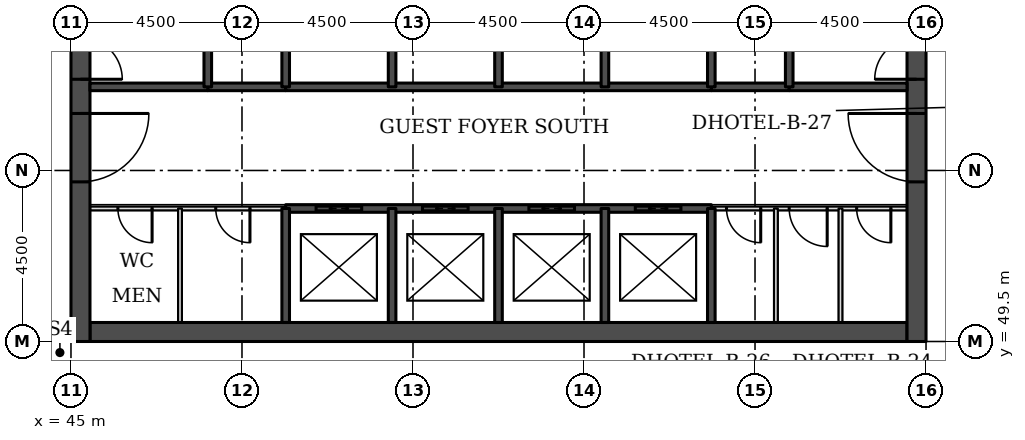
"""IFC4 building model, lengths in metres.
Left out: names, types, materials, properties, quantities, classifications, styles, units other than length and angle.
Written with IfcOpenShell. Run it as: python <this file> out.ifc"""

import sys

from ifc_helpers import new_model, si_unit, direction, frame, frame_2d, origin, place, context, subcontext, project, spatial, rectangle, extrude, element, fill, save


model = new_model("IFC4")
c1 = context("Model", 3, precision=1e-05, world=origin(), true_north=direction((0.0, 1.0)))
c2 = subcontext(c1, "Body", "Model", "MODEL_VIEW")
j1 = project(units=[si_unit("LENGTHUNIT", "METRE"), si_unit("PLANEANGLEUNIT", "RADIAN")], contexts=[c1])
p1 = place(None, origin())
s1 = spatial("IfcSite", under=j1, at=p1, CompositionType="ELEMENT")
p2 = place(p1, origin())
s2 = spatial("IfcBuilding", under=s1, at=p2, CompositionType="ELEMENT")
p3 = place(p2, frame((0.0, 0.0, 29.7)))
s3 = spatial("IfcBuildingStorey", under=s2, at=p3, CompositionType="ELEMENT", Elevation=29.7)
p4 = place(p3, frame((45.5, 49.75, 0.0), z_axis=(0.0, 0.0, 1.0), x_axis=(1.0, 0.0, 0.0)))
e1 = element("IfcWall", 1, at=p4, inside=s3, PredefinedType="SHEAR", context=c2, shape_type="SweptSolid", body=[
    extrude(rectangle(XDim=21.5, YDim=0.5, at=frame_2d((10.75, 0.0))), origin(), (0.0, 0.0, 1.0), 3.3),
])
p5 = place(p3, frame((45.25, 49.5, 0.0), z_axis=(0.0, 0.0, 1.0), x_axis=(0.0, 1.0, 0.0)))
e2 = element("IfcWall", 2, at=p5, inside=s3, PredefinedType="SHEAR", context=c2, shape_type="SweptSolid", body=[
    extrude(rectangle(XDim=22.5, YDim=0.5, at=frame_2d((11.25, 0.0))), origin(), (0.0, 0.0, 1.0), 3.3),
])
p6 = place(p5, frame((4.2, 0.0, 0.0)))
e3 = element("IfcOpeningElement", 3, at=p6, cuts=e2, PredefinedType="OPENING", context=c2, shape_type="SweptSolid", body=[
    extrude(rectangle(XDim=1.8, YDim=2.1, at=frame_2d((0.9, 1.05))), frame((0.0, 0.26, 0.0), z_axis=(0.0, -1.0, 0.0), x_axis=(1.0, 0.0, 0.0)), (0.0, 0.0, 1.0), 0.52),
])
p7 = place(p5, frame((6.9, 0.0, 0.0)))
e4 = element("IfcOpeningElement", 4, at=p7, cuts=e2, PredefinedType="OPENING", context=c2, shape_type="SweptSolid", body=[
    extrude(rectangle(XDim=1.1, YDim=2.1, at=frame_2d((0.55, 1.05))), frame((0.0, 0.26, 0.0), z_axis=(0.0, -1.0, 0.0), x_axis=(1.0, 0.0, 0.0)), (0.0, 0.0, 1.0), 0.52),
])
p8 = place(p5, frame((13.6, 0.0, 0.0)))
e5 = element("IfcOpeningElement", 5, at=p8, cuts=e2, PredefinedType="OPENING", context=c2, shape_type="SweptSolid", body=[
    extrude(rectangle(XDim=1.1, YDim=2.1, at=frame_2d((0.55, 1.05))), frame((0.0, 0.26, 0.0), z_axis=(0.0, -1.0, 0.0), x_axis=(1.0, 0.0, 0.0)), (0.0, 0.0, 1.0), 0.52),
])
p9 = place(p5, frame((16.5, 0.0, 0.0)))
e6 = element("IfcOpeningElement", 6, at=p9, cuts=e2, PredefinedType="OPENING", context=c2, shape_type="SweptSolid", body=[
    extrude(rectangle(XDim=1.8, YDim=2.1, at=frame_2d((0.9, 1.05))), frame((0.0, 0.26, 0.0), z_axis=(0.0, -1.0, 0.0), x_axis=(1.0, 0.0, 0.0)), (0.0, 0.0, 1.0), 0.52),
])
p10 = place(p3, frame((67.25, 49.5, 0.0), z_axis=(0.0, 0.0, 1.0), x_axis=(0.0, 1.0, 0.0)))
e7 = element("IfcWall", 7, at=p10, inside=s3, PredefinedType="SHEAR", context=c2, shape_type="SweptSolid", body=[
    extrude(rectangle(XDim=22.5, YDim=0.5, at=frame_2d((11.25, 0.0))), origin(), (0.0, 0.0, 1.0), 3.3),
])
p11 = place(p10, frame((4.2, 0.0, 0.0)))
e8 = element("IfcOpeningElement", 8, at=p11, cuts=e7, PredefinedType="OPENING", context=c2, shape_type="SweptSolid", body=[
    extrude(rectangle(XDim=1.8, YDim=2.1, at=frame_2d((0.9, 1.05))), frame((0.0, 0.26, 0.0), z_axis=(0.0, -1.0, 0.0), x_axis=(1.0, 0.0, 0.0)), (0.0, 0.0, 1.0), 0.52),
])
p12 = place(p10, frame((6.9, 0.0, 0.0)))
e9 = element("IfcOpeningElement", 9, at=p12, cuts=e7, PredefinedType="OPENING", context=c2, shape_type="SweptSolid", body=[
    extrude(rectangle(XDim=1.1, YDim=2.1, at=frame_2d((0.55, 1.05))), frame((0.0, 0.26, 0.0), z_axis=(0.0, -1.0, 0.0), x_axis=(1.0, 0.0, 0.0)), (0.0, 0.0, 1.0), 0.52),
])
p13 = place(p10, frame((13.6, 0.0, 0.0)))
e10 = element("IfcOpeningElement", 10, at=p13, cuts=e7, PredefinedType="OPENING", context=c2, shape_type="SweptSolid", body=[
    extrude(rectangle(XDim=1.1, YDim=2.1, at=frame_2d((0.55, 1.05))), frame((0.0, 0.26, 0.0), z_axis=(0.0, -1.0, 0.0), x_axis=(1.0, 0.0, 0.0)), (0.0, 0.0, 1.0), 0.52),
])
p14 = place(p10, frame((16.5, 0.0, 0.0)))
e11 = element("IfcOpeningElement", 11, at=p14, cuts=e7, PredefinedType="OPENING", context=c2, shape_type="SweptSolid", body=[
    extrude(rectangle(XDim=1.8, YDim=2.1, at=frame_2d((0.9, 1.05))), frame((0.0, 0.26, 0.0), z_axis=(0.0, -1.0, 0.0), x_axis=(1.0, 0.0, 0.0)), (0.0, 0.0, 1.0), 0.52),
])
p15 = place(p3, frame((45.5, 53.0, 0.0), z_axis=(0.0, 0.0, 1.0), x_axis=(1.0, 0.0, 0.0)))
e12 = element("IfcWall", 12, at=p15, inside=s3, PredefinedType="PARTITIONING", context=c2, shape_type="SweptSolid", body=[
    extrude(rectangle(XDim=5.15, YDim=0.1, at=frame_2d((2.575, 0.0))), origin(), (0.0, 0.0, 1.0), 3.08),
])
p16 = place(p15, frame((0.735, 0.0, 0.0)))
e13 = element("IfcOpeningElement", 13, at=p16, cuts=e12, PredefinedType="OPENING", context=c2, shape_type="SweptSolid", body=[
    extrude(rectangle(XDim=0.9, YDim=2.1, at=frame_2d((0.45, 1.05))), frame((0.0, 0.06, 0.0), z_axis=(0.0, -1.0, 0.0), x_axis=(1.0, 0.0, 0.0)), (0.0, 0.0, 1.0), 0.12),
])
p17 = place(p15, frame((3.31, 0.0, 0.0)))
e14 = element("IfcOpeningElement", 14, at=p17, cuts=e12, PredefinedType="OPENING", context=c2, shape_type="SweptSolid", body=[
    extrude(rectangle(XDim=0.9, YDim=2.1, at=frame_2d((0.45, 1.05))), frame((0.0, 0.06, 0.0), z_axis=(0.0, -1.0, 0.0), x_axis=(1.0, 0.0, 0.0)), (0.0, 0.0, 1.0), 0.12),
])
p18 = place(p3, frame((61.85, 53.0, 0.0), z_axis=(0.0, 0.0, 1.0), x_axis=(1.0, 0.0, 0.0)))
e15 = element("IfcWall", 15, at=p18, inside=s3, PredefinedType="PARTITIONING", context=c2, shape_type="SweptSolid", body=[
    extrude(rectangle(XDim=5.15, YDim=0.1, at=frame_2d((2.575, 0.0))), origin(), (0.0, 0.0, 1.0), 3.08),
])
p19 = place(p18, frame((3.824, 0.0, 0.0)))
e16 = element("IfcOpeningElement", 16, at=p19, cuts=e15, PredefinedType="OPENING", context=c2, shape_type="SweptSolid", body=[
    extrude(rectangle(XDim=0.9, YDim=2.1, at=frame_2d((0.45, 1.05))), frame((0.0, 0.06, 0.0), z_axis=(0.0, -1.0, 0.0), x_axis=(1.0, 0.0, 0.0)), (0.0, 0.0, 1.0), 0.12),
])
p20 = place(p18, frame((2.049, 0.0, 0.0)))
e17 = element("IfcOpeningElement", 17, at=p20, cuts=e15, PredefinedType="OPENING", context=c2, shape_type="SweptSolid", body=[
    extrude(rectangle(XDim=1.0, YDim=2.1, at=frame_2d((0.5, 1.05))), frame((0.0, 0.06, 0.0), z_axis=(0.0, -1.0, 0.0), x_axis=(1.0, 0.0, 0.0)), (0.0, 0.0, 1.0), 0.12),
])
p21 = place(p18, frame((0.4, 0.0, 0.0)))
e18 = element("IfcOpeningElement", 18, at=p21, cuts=e15, PredefinedType="OPENING", context=c2, shape_type="SweptSolid", body=[
    extrude(rectangle(XDim=0.9, YDim=2.1, at=frame_2d((0.45, 1.05))), frame((0.0, 0.06, 0.0), z_axis=(0.0, -1.0, 0.0), x_axis=(1.0, 0.0, 0.0)), (0.0, 0.0, 1.0), 0.12),
])
p22 = place(p3, frame((50.65, 53.0, 0.0), z_axis=(0.0, 0.0, 1.0), x_axis=(1.0, 0.0, 0.0)))
e19 = element("IfcWall", 19, at=p22, inside=s3, PredefinedType="SOLIDWALL", context=c2, shape_type="SweptSolid", body=[
    extrude(rectangle(XDim=11.2, YDim=0.2, at=frame_2d((5.6, 0.0))), origin(), (0.0, 0.0, 1.0), 3.08),
])
p23 = place(p22, frame((0.8, 0.0, 0.0)))
e20 = element("IfcOpeningElement", 20, at=p23, cuts=e19, PredefinedType="OPENING", context=c2, shape_type="SweptSolid", body=[
    extrude(rectangle(XDim=1.2, YDim=2.1, at=frame_2d((0.6, 1.05))), frame((0.0, 0.11, 0.0), z_axis=(0.0, -1.0, 0.0), x_axis=(1.0, 0.0, 0.0)), (0.0, 0.0, 1.0), 0.22),
])
p24 = place(p22, frame((3.6, 0.0, 0.0)))
e21 = element("IfcOpeningElement", 21, at=p24, cuts=e19, PredefinedType="OPENING", context=c2, shape_type="SweptSolid", body=[
    extrude(rectangle(XDim=1.2, YDim=2.1, at=frame_2d((0.6, 1.05))), frame((0.0, 0.11, 0.0), z_axis=(0.0, -1.0, 0.0), x_axis=(1.0, 0.0, 0.0)), (0.0, 0.0, 1.0), 0.22),
])
p25 = place(p22, frame((6.4, 0.0, 0.0)))
e22 = element("IfcOpeningElement", 22, at=p25, cuts=e19, PredefinedType="OPENING", context=c2, shape_type="SweptSolid", body=[
    extrude(rectangle(XDim=1.2, YDim=2.1, at=frame_2d((0.6, 1.05))), frame((0.0, 0.11, 0.0), z_axis=(0.0, -1.0, 0.0), x_axis=(1.0, 0.0, 0.0)), (0.0, 0.0, 1.0), 0.22),
])
p26 = place(p22, frame((9.2, 0.0, 0.0)))
e23 = element("IfcOpeningElement", 23, at=p26, cuts=e19, PredefinedType="OPENING", context=c2, shape_type="SweptSolid", body=[
    extrude(rectangle(XDim=1.2, YDim=2.1, at=frame_2d((0.6, 1.05))), frame((0.0, 0.11, 0.0), z_axis=(0.0, -1.0, 0.0), x_axis=(1.0, 0.0, 0.0)), (0.0, 0.0, 1.0), 0.22),
])
for number, where, z_axis, x_axis in (
    (24, (48.6, 56.2, 0.0), (0.0, 0.0, 1.0), (1.0, 0.0, 0.0)),
    (25, (61.85, 56.2, 0.0), (0.0, 0.0, 1.0), (1.0, 0.0, 0.0)),
):
    element("IfcWall", number, at=place(p3, frame(where, z_axis=z_axis, x_axis=x_axis)), inside=s3, PredefinedType="SOLIDWALL", context=c2, shape_type="SweptSolid", body=[
        extrude(rectangle(XDim=2.05, YDim=0.2, at=frame_2d((1.025, 0.0))), origin(), (0.0, 0.0, 1.0), 3.08),
    ])
p27 = place(p3, frame((45.5, 56.2, 0.0), z_axis=(0.0, 0.0, 1.0), x_axis=(1.0, 0.0, 0.0)))
e26 = element("IfcWall", 26, at=p27, inside=s3, PredefinedType="SOLIDWALL", context=c2, shape_type="SweptSolid", body=[
    extrude(rectangle(XDim=3.1, YDim=0.2, at=frame_2d((1.55, 0.0))), origin(), (0.0, 0.0, 1.0), 3.08),
])
p28 = place(p3, frame((50.65, 56.2, 0.0), z_axis=(0.0, 0.0, 1.0), x_axis=(1.0, 0.0, 0.0)))
e27 = element("IfcWall", 27, at=p28, inside=s3, PredefinedType="SOLIDWALL", context=c2, shape_type="SweptSolid", body=[
    extrude(rectangle(XDim=11.2, YDim=0.2, at=frame_2d((5.6, 0.0))), origin(), (0.0, 0.0, 1.0), 3.08),
])
p29 = place(p3, frame((63.9, 56.2, 0.0), z_axis=(0.0, 0.0, 1.0), x_axis=(1.0, 0.0, 0.0)))
e28 = element("IfcWall", 28, at=p29, inside=s3, PredefinedType="SOLIDWALL", context=c2, shape_type="SweptSolid", body=[
    extrude(rectangle(XDim=3.1, YDim=0.2, at=frame_2d((1.55, 0.0))), origin(), (0.0, 0.0, 1.0), 3.08),
])
p30 = place(p3, frame((47.869, 50.0, 0.0), z_axis=(0.0, 0.0, 1.0), x_axis=(0.0, 1.0, 0.0)))
e29 = element("IfcWall", 29, at=p30, inside=s3, PredefinedType="PARTITIONING", context=c2, shape_type="SweptSolid", body=[
    extrude(rectangle(XDim=3.0, YDim=0.1, at=frame_2d((1.5, 0.0))), origin(), (0.0, 0.0, 1.0), 3.08),
])
p31 = place(p3, frame((48.6, 56.2, 0.0), z_axis=(0.0, 0.0, 1.0), x_axis=(0.0, 1.0, 0.0)))
e30 = element("IfcWall", 30, at=p31, inside=s3, PredefinedType="SOLIDWALL", context=c2, shape_type="SweptSolid", body=[
    extrude(rectangle(XDim=5.8, YDim=0.2, at=frame_2d((2.9, 0.0))), origin(), (0.0, 0.0, 1.0), 3.08),
])
p32 = place(p3, frame((50.65, 50.0, 0.0), z_axis=(0.0, 0.0, 1.0), x_axis=(0.0, 1.0, 0.0)))
e31 = element("IfcWall", 31, at=p32, inside=s3, PredefinedType="SOLIDWALL", context=c2, shape_type="SweptSolid", body=[
    extrude(rectangle(XDim=3.0, YDim=0.2, at=frame_2d((1.5, 0.0))), origin(), (0.0, 0.0, 1.0), 3.08),
])
p33 = place(p3, frame((50.65, 56.2, 0.0), z_axis=(0.0, 0.0, 1.0), x_axis=(0.0, 1.0, 0.0)))
e32 = element("IfcWall", 32, at=p33, inside=s3, PredefinedType="SOLIDWALL", context=c2, shape_type="SweptSolid", body=[
    extrude(rectangle(XDim=2.8, YDim=0.2, at=frame_2d((1.4, 0.0))), origin(), (0.0, 0.0, 1.0), 3.08),
])
p34 = place(p3, frame((53.45, 50.0, 0.0), z_axis=(0.0, 0.0, 1.0), x_axis=(0.0, 1.0, 0.0)))
e33 = element("IfcWall", 33, at=p34, inside=s3, PredefinedType="SOLIDWALL", context=c2, shape_type="SweptSolid", body=[
    extrude(rectangle(XDim=3.0, YDim=0.2, at=frame_2d((1.5, 0.0))), origin(), (0.0, 0.0, 1.0), 3.08),
])
p35 = place(p3, frame((53.45, 56.2, 0.0), z_axis=(0.0, 0.0, 1.0), x_axis=(0.0, 1.0, 0.0)))
e34 = element("IfcWall", 34, at=p35, inside=s3, PredefinedType="SOLIDWALL", context=c2, shape_type="SweptSolid", body=[
    extrude(rectangle(XDim=2.8, YDim=0.2, at=frame_2d((1.4, 0.0))), origin(), (0.0, 0.0, 1.0), 3.08),
])
p36 = place(p3, frame((56.25, 50.0, 0.0), z_axis=(0.0, 0.0, 1.0), x_axis=(0.0, 1.0, 0.0)))
e35 = element("IfcWall", 35, at=p36, inside=s3, PredefinedType="SOLIDWALL", context=c2, shape_type="SweptSolid", body=[
    extrude(rectangle(XDim=3.0, YDim=0.2, at=frame_2d((1.5, 0.0))), origin(), (0.0, 0.0, 1.0), 3.08),
])
p37 = place(p3, frame((56.25, 56.2, 0.0), z_axis=(0.0, 0.0, 1.0), x_axis=(0.0, 1.0, 0.0)))
e36 = element("IfcWall", 36, at=p37, inside=s3, PredefinedType="SOLIDWALL", context=c2, shape_type="SweptSolid", body=[
    extrude(rectangle(XDim=2.8, YDim=0.2, at=frame_2d((1.4, 0.0))), origin(), (0.0, 0.0, 1.0), 3.08),
])
p38 = place(p3, frame((59.05, 50.0, 0.0), z_axis=(0.0, 0.0, 1.0), x_axis=(0.0, 1.0, 0.0)))
e37 = element("IfcWall", 37, at=p38, inside=s3, PredefinedType="SOLIDWALL", context=c2, shape_type="SweptSolid", body=[
    extrude(rectangle(XDim=3.0, YDim=0.2, at=frame_2d((1.5, 0.0))), origin(), (0.0, 0.0, 1.0), 3.08),
])
p39 = place(p3, frame((59.05, 56.2, 0.0), z_axis=(0.0, 0.0, 1.0), x_axis=(0.0, 1.0, 0.0)))
e38 = element("IfcWall", 38, at=p39, inside=s3, PredefinedType="SOLIDWALL", context=c2, shape_type="SweptSolid", body=[
    extrude(rectangle(XDim=2.8, YDim=0.2, at=frame_2d((1.4, 0.0))), origin(), (0.0, 0.0, 1.0), 3.08),
])
p40 = place(p3, frame((61.85, 50.0, 0.0), z_axis=(0.0, 0.0, 1.0), x_axis=(0.0, 1.0, 0.0)))
e39 = element("IfcWall", 39, at=p40, inside=s3, PredefinedType="SOLIDWALL", context=c2, shape_type="SweptSolid", body=[
    extrude(rectangle(XDim=3.0, YDim=0.2, at=frame_2d((1.5, 0.0))), origin(), (0.0, 0.0, 1.0), 3.08),
])
p41 = place(p3, frame((61.85, 56.2, 0.0), z_axis=(0.0, 0.0, 1.0), x_axis=(0.0, 1.0, 0.0)))
e40 = element("IfcWall", 40, at=p41, inside=s3, PredefinedType="SOLIDWALL", context=c2, shape_type="SweptSolid", body=[
    extrude(rectangle(XDim=2.8, YDim=0.2, at=frame_2d((1.4, 0.0))), origin(), (0.0, 0.0, 1.0), 3.08),
])
p42 = place(p3, frame((63.55, 50.0, 0.0), z_axis=(0.0, 0.0, 1.0), x_axis=(0.0, 1.0, 0.0)))
e41 = element("IfcWall", 41, at=p42, inside=s3, PredefinedType="PARTITIONING", context=c2, shape_type="SweptSolid", body=[
    extrude(rectangle(XDim=3.0, YDim=0.1, at=frame_2d((1.5, 0.0))), origin(), (0.0, 0.0, 1.0), 3.08),
])
p43 = place(p3, frame((63.9, 56.2, 0.0), z_axis=(0.0, 0.0, 1.0), x_axis=(0.0, 1.0, 0.0)))
e42 = element("IfcWall", 42, at=p43, inside=s3, PredefinedType="SOLIDWALL", context=c2, shape_type="SweptSolid", body=[
    extrude(rectangle(XDim=5.8, YDim=0.2, at=frame_2d((2.9, 0.0))), origin(), (0.0, 0.0, 1.0), 3.08),
])
p44 = place(p3, frame((65.249, 50.0, 0.0), z_axis=(0.0, 0.0, 1.0), x_axis=(0.0, 1.0, 0.0)))
e43 = element("IfcWall", 43, at=p44, inside=s3, PredefinedType="PARTITIONING", context=c2, shape_type="SweptSolid", body=[
    extrude(rectangle(XDim=3.0, YDim=0.1, at=frame_2d((1.5, 0.0))), origin(), (0.0, 0.0, 1.0), 3.08),
])
p45 = place(p23, origin())
e44 = element("IfcDoor", 44, at=p45, inside=s3, OperationType="DOUBLE_DOOR_SLIDING", PredefinedType="DOOR", context=c2, shape_type="SweptSolid", body=[
    extrude(rectangle(XDim=1.2, YDim=2.1, at=frame_2d((0.6, 1.05))), frame((0.0, 0.025, 0.0), z_axis=(0.0, -1.0, 0.0), x_axis=(1.0, 0.0, 0.0)), (0.0, 0.0, 1.0), 0.05),
])
fill(e20, e44)
p46 = place(p24, origin())
e45 = element("IfcDoor", 45, at=p46, inside=s3, OperationType="DOUBLE_DOOR_SLIDING", PredefinedType="DOOR", context=c2, shape_type="SweptSolid", body=[
    extrude(rectangle(XDim=1.2, YDim=2.1, at=frame_2d((0.6, 1.05))), frame((0.0, 0.025, 0.0), z_axis=(0.0, -1.0, 0.0), x_axis=(1.0, 0.0, 0.0)), (0.0, 0.0, 1.0), 0.05),
])
fill(e21, e45)
p47 = place(p25, origin())
e46 = element("IfcDoor", 46, at=p47, inside=s3, OperationType="DOUBLE_DOOR_SLIDING", PredefinedType="DOOR", context=c2, shape_type="SweptSolid", body=[
    extrude(rectangle(XDim=1.2, YDim=2.1, at=frame_2d((0.6, 1.05))), frame((0.0, 0.025, 0.0), z_axis=(0.0, -1.0, 0.0), x_axis=(1.0, 0.0, 0.0)), (0.0, 0.0, 1.0), 0.05),
])
fill(e22, e46)
p48 = place(p26, origin())
e47 = element("IfcDoor", 47, at=p48, inside=s3, OperationType="DOUBLE_DOOR_SLIDING", PredefinedType="DOOR", context=c2, shape_type="SweptSolid", body=[
    extrude(rectangle(XDim=1.2, YDim=2.1, at=frame_2d((0.6, 1.05))), frame((0.0, 0.025, 0.0), z_axis=(0.0, -1.0, 0.0), x_axis=(1.0, 0.0, 0.0)), (0.0, 0.0, 1.0), 0.05),
])
fill(e23, e47)
p49 = place(p6, frame((1.8, 0.0, 0.0), z_axis=(0.0, 0.0, 1.0), x_axis=(-1.0, 0.0, 0.0)))
e48 = element("IfcDoor", 48, at=p49, inside=s3, OperationType="SINGLE_SWING_LEFT", PredefinedType="DOOR", context=c2, shape_type="SweptSolid", body=[
    extrude(rectangle(XDim=1.8, YDim=2.1, at=frame_2d((0.9, 1.05))), frame((0.0, 0.025, 0.0), z_axis=(0.0, -1.0, 0.0), x_axis=(1.0, 0.0, 0.0)), (0.0, 0.0, 1.0), 0.05),
])
fill(e3, e48)
p50 = place(p7, frame((1.1, 0.0, 0.0), z_axis=(0.0, 0.0, 1.0), x_axis=(-1.0, 0.0, 0.0)))
e49 = element("IfcDoor", 49, at=p50, inside=s3, OperationType="SINGLE_SWING_RIGHT", PredefinedType="DOOR", context=c2, shape_type="SweptSolid", body=[
    extrude(rectangle(XDim=1.1, YDim=2.1, at=frame_2d((0.55, 1.05))), frame((0.0, 0.025, 0.0), z_axis=(0.0, -1.0, 0.0), x_axis=(1.0, 0.0, 0.0)), (0.0, 0.0, 1.0), 0.05),
])
fill(e4, e49)
p51 = place(p11, origin())
e50 = element("IfcDoor", 50, at=p51, inside=s3, OperationType="SINGLE_SWING_RIGHT", PredefinedType="DOOR", context=c2, shape_type="SweptSolid", body=[
    extrude(rectangle(XDim=1.8, YDim=2.1, at=frame_2d((0.9, 1.05))), frame((0.0, 0.025, 0.0), z_axis=(0.0, -1.0, 0.0), x_axis=(1.0, 0.0, 0.0)), (0.0, 0.0, 1.0), 0.05),
])
fill(e8, e50)
p52 = place(p12, origin())
e51 = element("IfcDoor", 51, at=p52, inside=s3, OperationType="SINGLE_SWING_LEFT", PredefinedType="DOOR", context=c2, shape_type="SweptSolid", body=[
    extrude(rectangle(XDim=1.1, YDim=2.1, at=frame_2d((0.55, 1.05))), frame((0.0, 0.025, 0.0), z_axis=(0.0, -1.0, 0.0), x_axis=(1.0, 0.0, 0.0)), (0.0, 0.0, 1.0), 0.05),
])
fill(e9, e51)
p53 = place(p19, frame((0.9, 0.0, 0.0), z_axis=(0.0, 0.0, 1.0), x_axis=(-1.0, 0.0, 0.0)))
e52 = element("IfcDoor", 52, at=p53, inside=s3, OperationType="SINGLE_SWING_LEFT", PredefinedType="DOOR", context=c2, shape_type="SweptSolid", body=[
    extrude(rectangle(XDim=0.9, YDim=2.1, at=frame_2d((0.45, 1.05))), frame((0.0, 0.025, 0.0), z_axis=(0.0, -1.0, 0.0), x_axis=(1.0, 0.0, 0.0)), (0.0, 0.0, 1.0), 0.05),
])
fill(e16, e52)
p54 = place(p20, frame((1.0, 0.0, 0.0), z_axis=(0.0, 0.0, 1.0), x_axis=(-1.0, 0.0, 0.0)))
e53 = element("IfcDoor", 53, at=p54, inside=s3, OperationType="SINGLE_SWING_LEFT", PredefinedType="DOOR", context=c2, shape_type="SweptSolid", body=[
    extrude(rectangle(XDim=1.0, YDim=2.1, at=frame_2d((0.5, 1.05))), frame((0.0, 0.025, 0.0), z_axis=(0.0, -1.0, 0.0), x_axis=(1.0, 0.0, 0.0)), (0.0, 0.0, 1.0), 0.05),
])
fill(e17, e53)
p55 = place(p21, frame((0.9, 0.0, 0.0), z_axis=(0.0, 0.0, 1.0), x_axis=(-1.0, 0.0, 0.0)))
e54 = element("IfcDoor", 54, at=p55, inside=s3, OperationType="SINGLE_SWING_LEFT", PredefinedType="DOOR", context=c2, shape_type="SweptSolid", body=[
    extrude(rectangle(XDim=0.9, YDim=2.1, at=frame_2d((0.45, 1.05))), frame((0.0, 0.025, 0.0), z_axis=(0.0, -1.0, 0.0), x_axis=(1.0, 0.0, 0.0)), (0.0, 0.0, 1.0), 0.05),
])
fill(e18, e54)
p56 = place(p16, frame((0.9, 0.0, 0.0), z_axis=(0.0, 0.0, 1.0), x_axis=(-1.0, 0.0, 0.0)))
e55 = element("IfcDoor", 55, at=p56, inside=s3, OperationType="SINGLE_SWING_LEFT", PredefinedType="DOOR", context=c2, shape_type="SweptSolid", body=[
    extrude(rectangle(XDim=0.9, YDim=2.1, at=frame_2d((0.45, 1.05))), frame((0.0, 0.025, 0.0), z_axis=(0.0, -1.0, 0.0), x_axis=(1.0, 0.0, 0.0)), (0.0, 0.0, 1.0), 0.05),
])
fill(e13, e55)
p57 = place(p17, frame((0.9, 0.0, 0.0), z_axis=(0.0, 0.0, 1.0), x_axis=(-1.0, 0.0, 0.0)))
e56 = element("IfcDoor", 56, at=p57, inside=s3, OperationType="SINGLE_SWING_LEFT", PredefinedType="DOOR", context=c2, shape_type="SweptSolid", body=[
    extrude(rectangle(XDim=0.9, YDim=2.1, at=frame_2d((0.45, 1.05))), frame((0.0, 0.025, 0.0), z_axis=(0.0, -1.0, 0.0), x_axis=(1.0, 0.0, 0.0)), (0.0, 0.0, 1.0), 0.05),
])
fill(e14, e56)
save(model, sys.argv[1])
